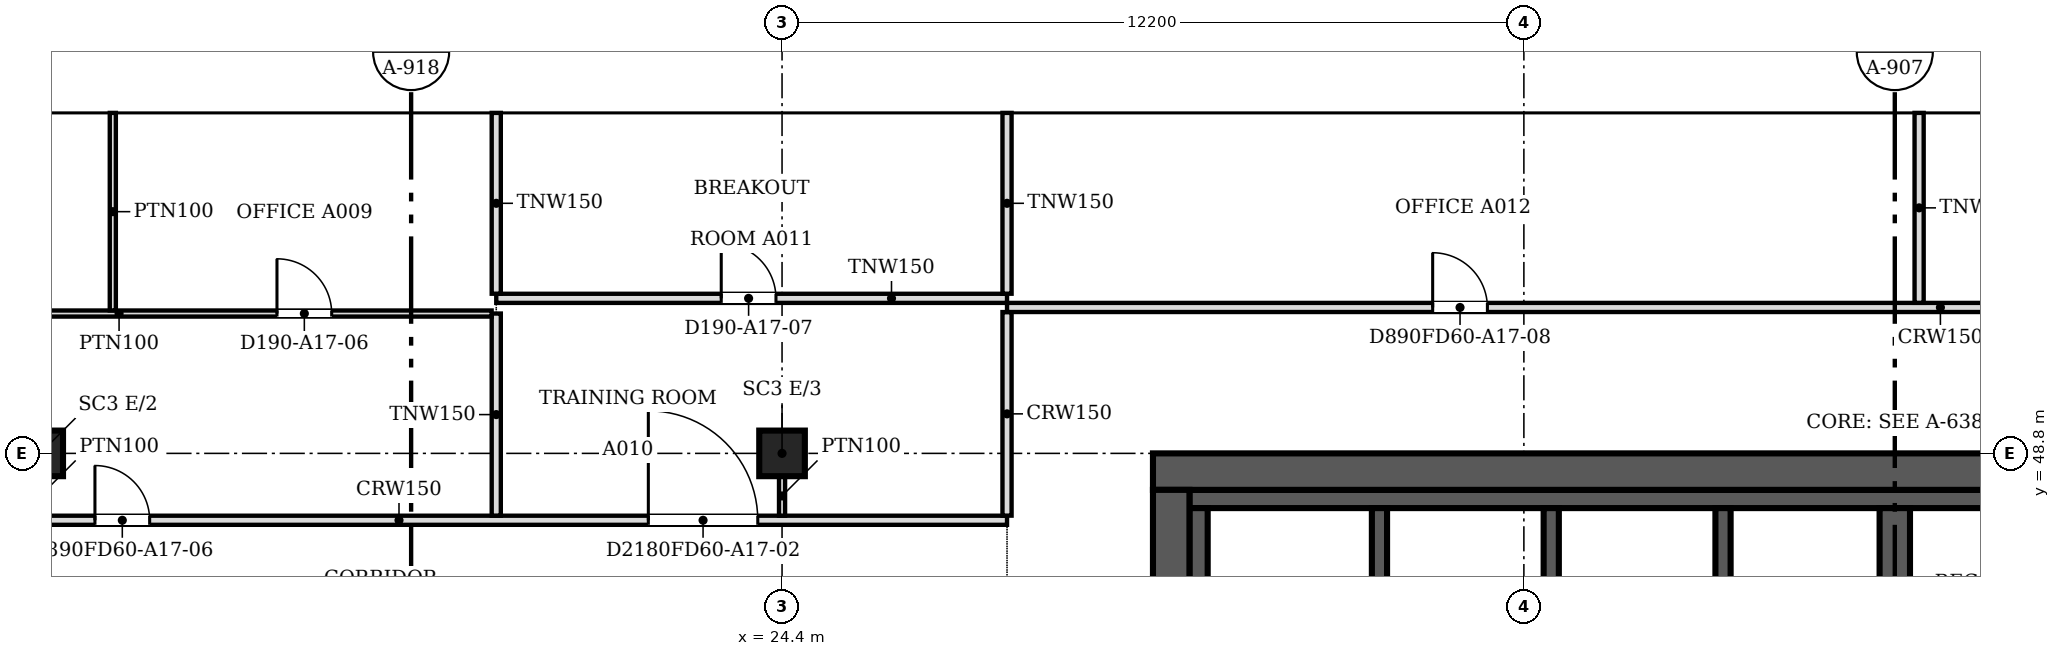
"""IFC4 building model, lengths in metres.
Left out: names, types, materials, properties, quantities, classifications, styles, units other than length and angle.
Written with IfcOpenShell. Run it as: python <this file> out.ifc"""

import sys

from ifc_helpers import new_model, si_unit, direction, frame, frame_2d, origin, origin_2d, place, context, subcontext, project, spatial, polyline, rectangle, outline, extrude, faceted_brep, source, transform, mapped, element, fill, save


model = new_model("IFC4")
c1 = context("Model", 3, precision=1e-05, world=origin(), true_north=direction((0.0, 1.0)))
c2 = subcontext(c1, "Body", "Model", "MODEL_VIEW")
j1 = project(units=[si_unit("LENGTHUNIT", "METRE"), si_unit("PLANEANGLEUNIT", "RADIAN")], contexts=[c1])
p1 = place(None, origin())
s1 = spatial("IfcSite", under=j1, at=p1, CompositionType="ELEMENT")
p2 = place(p1, origin())
s2 = spatial("IfcBuilding", under=s1, at=p2, CompositionType="ELEMENT")
p3 = place(p2, frame((0.0, 0.0, 185.8)))
s3 = spatial("IfcBuildingStorey", under=s2, at=p3, CompositionType="ELEMENT", Elevation=185.8)
for number, where, z_axis, x_axis in (
    (1, (12.2, 48.8, 0.0), (0.0, 0.0, 1.0), (1.0, 0.0, 0.0)),
    (2, (24.4, 48.8, 0.0), (0.0, 0.0, 1.0), (1.0, 0.0, 0.0)),
):
    element("IfcColumn", number, at=place(p3, frame(where, z_axis=z_axis, x_axis=x_axis)), inside=s3, PredefinedType="COLUMN", context=c2, shape_type="SweptSolid", body=[
        extrude(rectangle(XDim=0.75, YDim=0.75, at=origin_2d()), origin(), (0.0, 0.0, 1.0), 3.6),
    ])
m1 = source(origin(), c2, "Body", "SweptSolid", [
    extrude(outline(polyline([(3.05, 0.0), (6.1, 3.8), (3.05, 7.6), (0.0, 3.8), (3.05, 0.0)])), frame((0.0, 0.25, 0.0), z_axis=(0.0, -1.0, 0.0), x_axis=(1.0, 0.0, 0.0)), (0.0, 0.0, 1.0), 0.5),
])
p4 = place(p3, frame((45.75, 54.65, -3.8), z_axis=(0.0, 0.0, 1.0), x_axis=(-1.0, 0.0, 0.0)))
e3 = element("IfcWall", 3, at=p4, inside=s3, PredefinedType="SOLIDWALL", context=c2, shape_type="MappedRepresentation", body=[
    mapped(m1, transform((0.0, 0.0, 0.0), scale=1.0)),
])
m2 = source(origin(), c2, "Body", "SweptSolid", [
    extrude(outline(polyline([(3.05, 0.399), (5.78, 3.8), (3.05, 7.201), (0.321, 3.8), (3.05, 0.399)])), frame((0.0, 0.26, 0.0), z_axis=(0.0, -1.0, 0.0), x_axis=(1.0, 0.0, 0.0)), (0.0, 0.0, 1.0), 0.52),
])
p5 = place(p4, origin())
e4 = element("IfcOpeningElement", 4, at=p5, cuts=e3, PredefinedType="OPENING", context=c2, shape_type="MappedRepresentation", body=[
    mapped(m2, transform((0.0, 0.0, 0.0), scale=1.0)),
])
m3 = source(origin(), c2, "Body", "Brep", [
    faceted_brep([(3.05, -0.25, 0.0), (6.1, -0.25, 3.8), (6.1, -0.25, 3.8), (3.05, -0.25, 7.6), (0.0, -0.25, 3.8), (0.0, 0.25, 3.8), (3.05, 0.25, 7.6), (6.1, 0.25, 3.8), (6.1, 0.25, 3.8), (3.05, 0.25, 0.0)], [[[0, 1, 2, 3, 4]], [[5, 6, 7, 8, 9]], [[9, 8, 1, 0]], [[7, 6, 3, 2]], [[6, 5, 4, 3]], [[5, 9, 0, 4]], [[1, 8, 7, 2]]]),
])
p6 = place(p3, frame((39.65, 54.65, -3.8), z_axis=(0.0, 0.0, 1.0), x_axis=(-1.0, 0.0, 0.0)))
e5 = element("IfcWall", 5, at=p6, inside=s3, PredefinedType="SOLIDWALL", context=c2, shape_type="MappedRepresentation", body=[
    mapped(m3, transform((0.0, 0.0, 0.0), scale=1.0)),
])
p7 = place(p6, origin())
e6 = element("IfcOpeningElement", 6, at=p7, cuts=e5, PredefinedType="OPENING", context=c2, shape_type="MappedRepresentation", body=[
    mapped(m2, transform((0.0, 0.0, 0.0), scale=1.0)),
])
p8 = place(p3, frame((33.55, 54.65, -3.8), z_axis=(0.0, 0.0, 1.0), x_axis=(-1.0, 0.0, 0.0)))
e7 = element("IfcWall", 7, at=p8, inside=s3, PredefinedType="SOLIDWALL", context=c2, shape_type="MappedRepresentation", body=[
    mapped(m1, transform((0.0, 0.0, 0.0), scale=1.0)),
])
p9 = place(p8, origin())
e8 = element("IfcOpeningElement", 8, at=p9, cuts=e7, PredefinedType="OPENING", context=c2, shape_type="MappedRepresentation", body=[
    mapped(m2, transform((0.0, 0.0, 0.0), scale=1.0)),
])
p10 = place(p3, frame((27.45, 54.65, -3.8), z_axis=(0.0, 0.0, 1.0), x_axis=(-1.0, 0.0, 0.0)))
e9 = element("IfcWall", 9, at=p10, inside=s3, PredefinedType="SOLIDWALL", context=c2, shape_type="MappedRepresentation", body=[
    mapped(m3, transform((0.0, 0.0, 0.0), scale=1.0)),
])
p11 = place(p10, origin())
e10 = element("IfcOpeningElement", 10, at=p11, cuts=e9, PredefinedType="OPENING", context=c2, shape_type="MappedRepresentation", body=[
    mapped(m2, transform((0.0, 0.0, 0.0), scale=1.0)),
])
p12 = place(p3, frame((21.35, 54.65, -3.8), z_axis=(0.0, 0.0, 1.0), x_axis=(-1.0, 0.0, 0.0)))
e11 = element("IfcWall", 11, at=p12, inside=s3, PredefinedType="SOLIDWALL", context=c2, shape_type="MappedRepresentation", body=[
    mapped(m1, transform((0.0, 0.0, 0.0), scale=1.0)),
])
p13 = place(p12, origin())
e12 = element("IfcOpeningElement", 12, at=p13, cuts=e11, PredefinedType="OPENING", context=c2, shape_type="MappedRepresentation", body=[
    mapped(m2, transform((0.0, 0.0, 0.0), scale=1.0)),
])
p14 = place(p3, frame((15.25, 54.65, -3.8), z_axis=(0.0, 0.0, 1.0), x_axis=(-1.0, 0.0, 0.0)))
e13 = element("IfcWall", 13, at=p14, inside=s3, PredefinedType="SOLIDWALL", context=c2, shape_type="MappedRepresentation", body=[
    mapped(m1, transform((0.0, 0.0, 0.0), scale=1.0)),
])
p15 = place(p14, origin())
e14 = element("IfcOpeningElement", 14, at=p15, cuts=e13, PredefinedType="OPENING", context=c2, shape_type="MappedRepresentation", body=[
    mapped(m2, transform((0.0, 0.0, 0.0), scale=1.0)),
])
p16 = place(p2, frame((0.0, 0.0, 189.6)))
s4 = spatial("IfcBuildingStorey", under=s2, at=p16, CompositionType="ELEMENT", Elevation=189.6)
m4 = source(origin(), c2, "Body", "SweptSolid", [
    extrude(outline(polyline([(3.05, 0.0), (6.1, 3.8), (3.05, 7.6), (0.0, 3.8), (3.05, 0.0)])), frame((0.0, 0.25, 0.0), z_axis=(0.0, -1.0, 0.0), x_axis=(1.0, 0.0, 0.0)), (0.0, 0.0, 1.0), 0.5),
])
p17 = place(p16, frame((48.8, 54.65, -3.8), z_axis=(0.0, 0.0, 1.0), x_axis=(-1.0, 0.0, 0.0)))
e15 = element("IfcWall", 15, at=p17, inside=s4, PredefinedType="SOLIDWALL", context=c2, shape_type="MappedRepresentation", body=[
    mapped(m4, transform((0.0, 0.0, 0.0), scale=1.0)),
])
m5 = source(origin(), c2, "Body", "SweptSolid", [
    extrude(outline(polyline([(3.05, 0.399), (5.78, 3.8), (3.05, 7.2), (0.321, 3.8), (3.05, 0.399)])), frame((0.0, 0.26, 0.0), z_axis=(0.0, -1.0, 0.0), x_axis=(1.0, 0.0, 0.0)), (0.0, 0.0, 1.0), 0.52),
])
p18 = place(p17, origin())
e16 = element("IfcOpeningElement", 16, at=p18, cuts=e15, PredefinedType="OPENING", context=c2, shape_type="MappedRepresentation", body=[
    mapped(m5, transform((0.0, 0.0, 0.0), scale=1.0)),
])
m6 = source(origin(), c2, "Body", "Brep", [
    faceted_brep([(3.05, -0.25, 0.0), (6.1, -0.25, 3.8), (6.1, -0.25, 3.8), (3.05, -0.25, 7.6), (0.0, -0.25, 3.8), (0.0, 0.25, 3.8), (3.05, 0.25, 7.6), (6.1, 0.25, 3.8), (6.1, 0.25, 3.8), (3.05, 0.25, 0.0)], [[[0, 1, 2, 3, 4]], [[5, 6, 7, 8, 9]], [[9, 8, 1, 0]], [[7, 6, 3, 2]], [[6, 5, 4, 3]], [[5, 9, 0, 4]], [[1, 8, 7, 2]]]),
])
p19 = place(p16, frame((42.7, 54.65, -3.8), z_axis=(0.0, 0.0, 1.0), x_axis=(-1.0, 0.0, 0.0)))
e17 = element("IfcWall", 17, at=p19, inside=s4, PredefinedType="SOLIDWALL", context=c2, shape_type="MappedRepresentation", body=[
    mapped(m6, transform((0.0, 0.0, 0.0), scale=1.0)),
])
p20 = place(p19, origin())
e18 = element("IfcOpeningElement", 18, at=p20, cuts=e17, PredefinedType="OPENING", context=c2, shape_type="MappedRepresentation", body=[
    mapped(m5, transform((0.0, 0.0, 0.0), scale=1.0)),
])
p21 = place(p16, frame((36.6, 54.65, -3.8), z_axis=(0.0, 0.0, 1.0), x_axis=(-1.0, 0.0, 0.0)))
e19 = element("IfcWall", 19, at=p21, inside=s4, PredefinedType="SOLIDWALL", context=c2, shape_type="MappedRepresentation", body=[
    mapped(m4, transform((0.0, 0.0, 0.0), scale=1.0)),
])
p22 = place(p21, origin())
e20 = element("IfcOpeningElement", 20, at=p22, cuts=e19, PredefinedType="OPENING", context=c2, shape_type="MappedRepresentation", body=[
    mapped(m5, transform((0.0, 0.0, 0.0), scale=1.0)),
])
p23 = place(p16, frame((30.5, 54.65, -3.8), z_axis=(0.0, 0.0, 1.0), x_axis=(-1.0, 0.0, 0.0)))
e21 = element("IfcWall", 21, at=p23, inside=s4, PredefinedType="SOLIDWALL", context=c2, shape_type="MappedRepresentation", body=[
    mapped(m4, transform((0.0, 0.0, 0.0), scale=1.0)),
])
p24 = place(p23, origin())
e22 = element("IfcOpeningElement", 22, at=p24, cuts=e21, PredefinedType="OPENING", context=c2, shape_type="MappedRepresentation", body=[
    mapped(m5, transform((0.0, 0.0, 0.0), scale=1.0)),
])
p25 = place(p16, frame((24.4, 54.65, -3.8), z_axis=(0.0, 0.0, 1.0), x_axis=(-1.0, 0.0, 0.0)))
e23 = element("IfcWall", 23, at=p25, inside=s4, PredefinedType="SOLIDWALL", context=c2, shape_type="MappedRepresentation", body=[
    mapped(m6, transform((0.0, 0.0, 0.0), scale=1.0)),
])
p26 = place(p25, origin())
e24 = element("IfcOpeningElement", 24, at=p26, cuts=e23, PredefinedType="OPENING", context=c2, shape_type="MappedRepresentation", body=[
    mapped(m5, transform((0.0, 0.0, 0.0), scale=1.0)),
])
p27 = place(p16, frame((18.3, 54.65, -3.8), z_axis=(0.0, 0.0, 1.0), x_axis=(-1.0, 0.0, 0.0)))
e25 = element("IfcWall", 25, at=p27, inside=s4, PredefinedType="SOLIDWALL", context=c2, shape_type="MappedRepresentation", body=[
    mapped(m4, transform((0.0, 0.0, 0.0), scale=1.0)),
])
p28 = place(p27, origin())
e26 = element("IfcOpeningElement", 26, at=p28, cuts=e25, PredefinedType="OPENING", context=c2, shape_type="MappedRepresentation", body=[
    mapped(m5, transform((0.0, 0.0, 0.0), scale=1.0)),
])
p29 = place(p3, frame((30.8, 25.0, 0.0), z_axis=(0.0, 0.0, 1.0), x_axis=(0.0, 1.0, 0.0)))
e27 = element("IfcWall", 27, at=p29, inside=s3, PredefinedType="SHEAR", context=c2, shape_type="SweptSolid", body=[
    extrude(rectangle(XDim=23.2, YDim=0.6, at=frame_2d((11.6, 0.0))), origin(), (0.0, 0.0, 1.0), 3.8),
])
m7 = source(origin(), c2, "Body", "SweptSolid", [
    extrude(rectangle(XDim=2.1, YDim=2.4, at=frame_2d((1.05, 1.2))), frame((0.0, 0.31, 0.0), z_axis=(0.0, -1.0, 0.0), x_axis=(1.0, 0.0, 0.0)), (0.0, 0.0, 1.0), 0.62),
])
p30 = place(p29, frame((4.8, 0.0, 0.0)))
e28 = element("IfcOpeningElement", 28, at=p30, cuts=e27, PredefinedType="OPENING", context=c2, shape_type="MappedRepresentation", body=[
    mapped(m7, transform((0.0, 0.0, 0.0), scale=1.0)),
])
p31 = place(p29, frame((16.3, 0.0, 0.0)))
e29 = element("IfcOpeningElement", 29, at=p31, cuts=e27, PredefinedType="OPENING", context=c2, shape_type="MappedRepresentation", body=[
    mapped(m7, transform((0.0, 0.0, 0.0), scale=1.0)),
])
p32 = place(p3, frame((30.5, 48.5, 0.0), z_axis=(0.0, 0.0, 1.0), x_axis=(1.0, 0.0, 0.0)))
e30 = element("IfcWall", 30, at=p32, inside=s3, PredefinedType="SHEAR", context=c2, shape_type="SweptSolid", body=[
    extrude(rectangle(XDim=24.4, YDim=0.6, at=frame_2d((12.2, 0.0))), origin(), (0.0, 0.0, 1.0), 3.8),
])
p33 = place(p3, frame((31.1, 48.05, 0.0), z_axis=(0.0, 0.0, 1.0), x_axis=(1.0, 0.0, 0.0)))
e31 = element("IfcWall", 31, at=p33, inside=s3, PredefinedType="SOLIDWALL", context=c2, shape_type="SweptSolid", body=[
    extrude(rectangle(XDim=23.2, YDim=0.3, at=frame_2d((11.6, 0.0))), origin(), (0.0, 0.0, 1.0), 3.8),
])
p34 = place(p3, frame((31.25, 43.4, 0.0), z_axis=(0.0, 0.0, 1.0), x_axis=(0.0, 1.0, 0.0)))
e32 = element("IfcWall", 32, at=p34, inside=s3, PredefinedType="SOLIDWALL", context=c2, shape_type="SweptSolid", body=[
    extrude(rectangle(XDim=4.5, YDim=0.3, at=frame_2d((2.25, 0.0))), origin(), (0.0, 0.0, 1.0), 3.8),
])
p35 = place(p3, frame((42.7, 44.9, 0.0), z_axis=(0.0, 0.0, 1.0), x_axis=(0.0, 1.0, 0.0)))
e33 = element("IfcWall", 33, at=p35, inside=s3, PredefinedType="SHEAR", context=c2, shape_type="SweptSolid", body=[
    extrude(rectangle(XDim=3.0, YDim=0.5, at=frame_2d((1.5, 0.0))), origin(), (0.0, 0.0, 1.0), 3.8),
])
for number, where, z_axis, x_axis in (
    (34, (34.225, 45.025, 0.0), (0.0, 0.0, 1.0), (0.0, 1.0, 0.0)),
    (35, (37.05, 45.025, 0.0), (0.0, 0.0, 1.0), (0.0, 1.0, 0.0)),
    (36, (39.875, 45.025, 0.0), (0.0, 0.0, 1.0), (0.0, 1.0, 0.0)),
):
    element("IfcWall", number, at=place(p3, frame(where, z_axis=z_axis, x_axis=x_axis)), inside=s3, PredefinedType="SOLIDWALL", context=c2, shape_type="SweptSolid", body=[
        extrude(rectangle(XDim=2.875, YDim=0.25, at=frame_2d((1.438, 0.0))), origin(), (0.0, 0.0, 1.0), 3.8),
    ])
p36 = place(p3, frame((7.5, 47.7, 0.0), z_axis=(0.0, 0.0, 1.0), x_axis=(1.0, 0.0, 0.0)))
e37 = element("IfcWall", 37, at=p36, inside=s3, PredefinedType="PARTITIONING", context=c2, shape_type="SweptSolid", body=[
    extrude(rectangle(XDim=20.6, YDim=0.15, at=frame_2d((10.3, 0.0))), origin(), (0.0, 0.0, 1.0), 3.067),
])
m8 = source(origin(), c2, "Body", "SweptSolid", [
    extrude(rectangle(XDim=1.8, YDim=2.1, at=frame_2d((0.9, 1.05))), frame((0.0, 0.085, 0.0), z_axis=(0.0, -1.0, 0.0), x_axis=(1.0, 0.0, 0.0)), (0.0, 0.0, 1.0), 0.17),
])
p37 = place(p36, frame((14.701, 0.0, 0.0)))
e38 = element("IfcOpeningElement", 38, at=p37, cuts=e37, PredefinedType="OPENING", context=c2, shape_type="MappedRepresentation", body=[
    mapped(m8, transform((0.0, 0.0, 0.0), scale=1.0)),
])
m9 = source(origin(), c2, "Body", "SweptSolid", [
    extrude(rectangle(XDim=0.9, YDim=2.1, at=frame_2d((0.45, 1.05))), frame((0.0, 0.085, 0.0), z_axis=(0.0, -1.0, 0.0), x_axis=(1.0, 0.0, 0.0)), (0.0, 0.0, 1.0), 0.17),
])
p38 = place(p36, frame((5.6, 0.0, 0.0)))
e39 = element("IfcOpeningElement", 39, at=p38, cuts=e37, PredefinedType="OPENING", context=c2, shape_type="MappedRepresentation", body=[
    mapped(m9, transform((0.0, 0.0, 0.0), scale=1.0)),
])
p39 = place(p3, frame((19.7, 47.776, 0.0), z_axis=(0.0, 0.0, 1.0), x_axis=(0.0, 1.0, 0.0)))
e40 = element("IfcWall", 40, at=p39, inside=s3, PredefinedType="PARTITIONING", context=c2, shape_type="SweptSolid", body=[
    extrude(rectangle(XDim=3.324, YDim=0.15, at=frame_2d((1.662, 0.0))), origin(), (0.0, 0.0, 1.0), 3.067),
])
p40 = place(p3, frame((28.1, 47.776, 0.0), z_axis=(0.0, 0.0, 1.0), x_axis=(0.0, 1.0, 0.0)))
e41 = element("IfcWall", 41, at=p40, inside=s3, PredefinedType="PARTITIONING", context=c2, shape_type="SweptSolid", body=[
    extrude(rectangle(XDim=3.348, YDim=0.15, at=frame_2d((1.674, 0.0))), origin(), (0.0, 0.0, 1.0), 3.067),
])
p41 = place(p3, frame((24.4, 48.425, 0.0), z_axis=(0.0, 0.0, 1.0), x_axis=(0.0, -1.0, 0.0)))
e42 = element("IfcWall", 42, at=p41, inside=s3, PredefinedType="PARTITIONING", context=c2, shape_type="SweptSolid", body=[
    extrude(rectangle(XDim=0.65, YDim=0.1, at=frame_2d((0.325, 0.0))), origin(), (0.0, 0.0, 1.0), 3.067),
])
p42 = place(p3, frame((7.5, 51.1, 0.0), z_axis=(0.0, 0.0, 1.0), x_axis=(1.0, 0.0, 0.0)))
e43 = element("IfcWall", 43, at=p42, inside=s3, PredefinedType="PARTITIONING", context=c2, shape_type="SweptSolid", body=[
    extrude(rectangle(XDim=12.124, YDim=0.1, at=frame_2d((6.062, 0.0))), origin(), (0.0, 0.0, 1.0), 3.067),
])
m10 = source(origin(), c2, "Body", "SweptSolid", [
    extrude(rectangle(XDim=0.9, YDim=2.1, at=frame_2d((0.45, 1.05))), frame((0.0, 0.06, 0.0), z_axis=(0.0, -1.0, 0.0), x_axis=(1.0, 0.0, 0.0)), (0.0, 0.0, 1.0), 0.12),
])
p43 = place(p42, frame((2.5, 0.0, 0.0)))
e44 = element("IfcOpeningElement", 44, at=p43, cuts=e43, PredefinedType="OPENING", context=c2, shape_type="MappedRepresentation", body=[
    mapped(m10, transform((0.0, 0.0, 0.0), scale=1.0)),
])
p44 = place(p42, frame((8.594, 0.0, 0.0)))
e45 = element("IfcOpeningElement", 45, at=p44, cuts=e43, PredefinedType="OPENING", context=c2, shape_type="MappedRepresentation", body=[
    mapped(m10, transform((0.0, 0.0, 0.0), scale=1.0)),
])
p45 = place(p3, frame((13.394, 51.151, 0.0), z_axis=(0.0, 0.0, 1.0), x_axis=(0.0, 1.0, 0.0)))
e46 = element("IfcWall", 46, at=p45, inside=s3, PredefinedType="PARTITIONING", context=c2, shape_type="SweptSolid", body=[
    extrude(rectangle(XDim=3.249, YDim=0.1, at=frame_2d((1.625, 0.0))), origin(), (0.0, 0.0, 1.0), 3.067),
])
p46 = place(p3, frame((28.1, 51.2, 0.0), z_axis=(0.0, 0.0, 1.0), x_axis=(1.0, 0.0, 0.0)))
e47 = element("IfcWall", 47, at=p46, inside=s3, PredefinedType="PARTITIONING", context=c2, shape_type="SweptSolid", body=[
    extrude(rectangle(XDim=31.438, YDim=0.15, at=frame_2d((15.719, 0.0))), origin(), (0.0, 0.0, 1.0), 3.067),
])
p47 = place(p46, frame((7.0, 0.0, 0.0)))
e48 = element("IfcOpeningElement", 48, at=p47, cuts=e47, PredefinedType="OPENING", context=c2, shape_type="MappedRepresentation", body=[
    mapped(m9, transform((0.0, 0.0, 0.0), scale=1.0)),
])
p48 = place(p46, frame((22.8, 0.0, 0.0)))
e49 = element("IfcOpeningElement", 49, at=p48, cuts=e47, PredefinedType="OPENING", context=c2, shape_type="MappedRepresentation", body=[
    mapped(m9, transform((0.0, 0.0, 0.0), scale=1.0)),
])
p49 = place(p3, frame((43.1, 51.276, 0.0), z_axis=(0.0, 0.0, 1.0), x_axis=(0.0, 1.0, 0.0)))
e50 = element("IfcWall", 50, at=p49, inside=s3, PredefinedType="PARTITIONING", context=c2, shape_type="SweptSolid", body=[
    extrude(rectangle(XDim=3.124, YDim=0.15, at=frame_2d((1.562, 0.0))), origin(), (0.0, 0.0, 1.0), 3.067),
])
p50 = place(p3, frame((19.7, 51.35, 0.0), z_axis=(0.0, 0.0, 1.0), x_axis=(1.0, 0.0, 0.0)))
e51 = element("IfcWall", 51, at=p50, inside=s3, PredefinedType="PARTITIONING", context=c2, shape_type="SweptSolid", body=[
    extrude(rectangle(XDim=8.4, YDim=0.15, at=frame_2d((4.2, 0.0))), origin(), (0.0, 0.0, 1.0), 3.067),
])
p51 = place(p50, frame((3.7, 0.0, 0.0)))
e52 = element("IfcOpeningElement", 52, at=p51, cuts=e51, PredefinedType="OPENING", context=c2, shape_type="MappedRepresentation", body=[
    mapped(m9, transform((0.0, 0.0, 0.0), scale=1.0)),
])
for number, where, z_axis, x_axis in (
    (53, (19.7, 51.426, 0.0), (0.0, 0.0, 1.0), (0.0, 1.0, 0.0)),
    (54, (28.1, 51.426, 0.0), (0.0, 0.0, 1.0), (0.0, 1.0, 0.0)),
):
    element("IfcWall", number, at=place(p3, frame(where, z_axis=z_axis, x_axis=x_axis)), inside=s3, PredefinedType="PARTITIONING", context=c2, shape_type="SweptSolid", body=[
        extrude(rectangle(XDim=2.974, YDim=0.15, at=frame_2d((1.487, 0.0))), origin(), (0.0, 0.0, 1.0), 3.067),
    ])
m11 = source(origin(), c2, "Body", "SweptSolid", [
    extrude(rectangle(XDim=0.9, YDim=2.1, at=frame_2d((0.45, 1.05))), frame((0.0, 0.025, 0.0), z_axis=(0.0, -1.0, 0.0), x_axis=(1.0, 0.0, 0.0)), (0.0, 0.0, 1.0), 0.05),
])
p52 = place(p44, origin())
e55 = element("IfcDoor", 55, at=p52, inside=s3, OperationType="SINGLE_SWING_LEFT", PredefinedType="DOOR", context=c2, shape_type="MappedRepresentation", body=[
    mapped(m11, transform((0.0, 0.0, 0.0), scale=1.0)),
])
fill(e45, e55)
m12 = source(origin(), c2, "Body", "SweptSolid", [
    extrude(rectangle(XDim=1.8, YDim=2.1, at=frame_2d((0.9, 1.05))), frame((0.0, 0.025, 0.0), z_axis=(0.0, -1.0, 0.0), x_axis=(1.0, 0.0, 0.0)), (0.0, 0.0, 1.0), 0.05),
])
p53 = place(p37, origin())
e56 = element("IfcDoor", 56, at=p53, inside=s3, OperationType="DOUBLE_DOOR_SINGLE_SWING", PredefinedType="DOOR", context=c2, shape_type="MappedRepresentation", body=[
    mapped(m12, transform((0.0, 0.0, 0.0), scale=1.0)),
])
fill(e38, e56)
p54 = place(p51, origin())
e57 = element("IfcDoor", 57, at=p54, inside=s3, OperationType="SINGLE_SWING_LEFT", PredefinedType="DOOR", context=c2, shape_type="MappedRepresentation", body=[
    mapped(m11, transform((0.0, 0.0, 0.0), scale=1.0)),
])
fill(e52, e57)
p55 = place(p38, origin())
e58 = element("IfcDoor", 58, at=p55, inside=s3, OperationType="SINGLE_SWING_LEFT", PredefinedType="DOOR", context=c2, shape_type="MappedRepresentation", body=[
    mapped(m11, transform((0.0, 0.0, 0.0), scale=1.0)),
])
fill(e39, e58)
p56 = place(p47, origin())
e59 = element("IfcDoor", 59, at=p56, inside=s3, OperationType="SINGLE_SWING_LEFT", PredefinedType="DOOR", context=c2, shape_type="MappedRepresentation", body=[
    mapped(m11, transform((0.0, 0.0, 0.0), scale=1.0)),
])
fill(e48, e59)
save(model, sys.argv[1])
